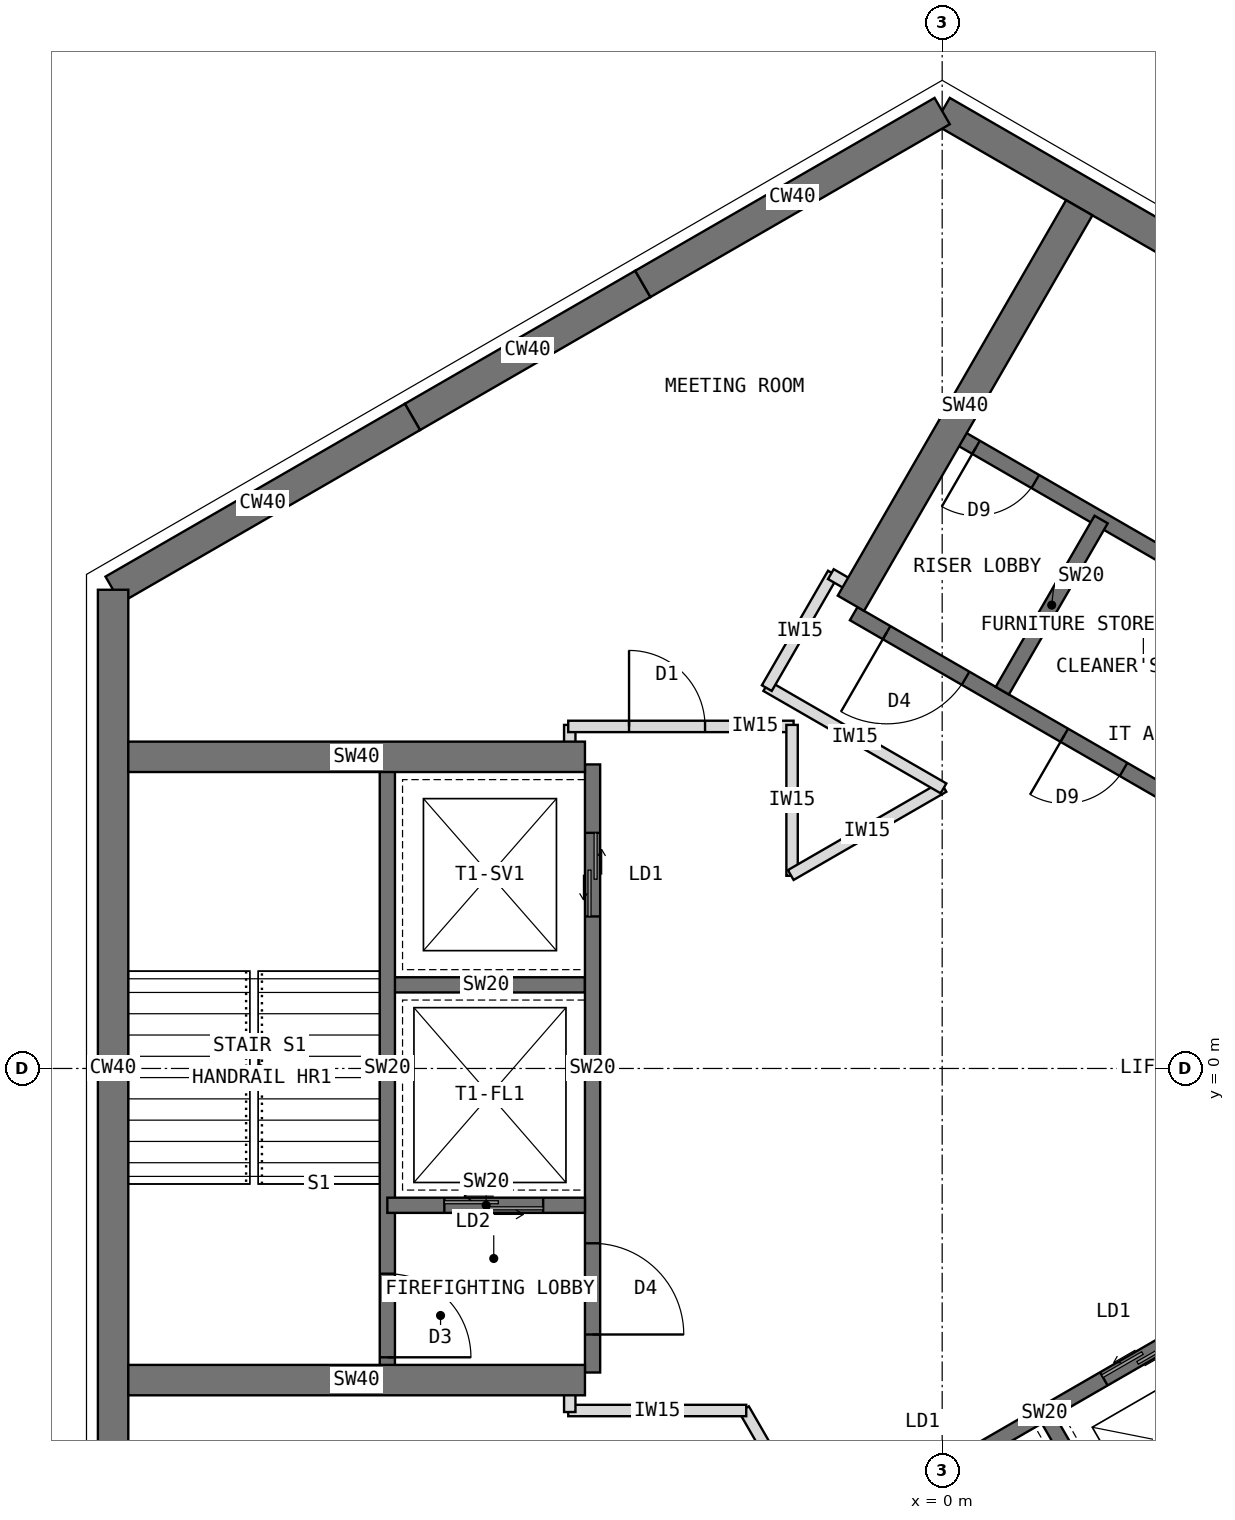
"""IFC4 building model, lengths in metres.
Left out: names, types, materials, properties, quantities, classifications, styles, units other than length and angle.
Written with IfcOpenShell. Run it as: python <this file> out.ifc"""

import sys

from ifc_helpers import new_model, si_unit, direction, frame, frame_2d, origin, place, context, subcontext, project, spatial, rectangle, extrude, element, fill, save


model = new_model("IFC4")
c1 = context("Model", 3, precision=1e-05, world=origin(), true_north=direction((0.0, 1.0)))
c2 = subcontext(c1, "Body", "Model", "MODEL_VIEW")
j1 = project(units=[si_unit("LENGTHUNIT", "METRE"), si_unit("PLANEANGLEUNIT", "RADIAN")], contexts=[c1])
p1 = place(None, origin())
s1 = spatial("IfcSite", under=j1, at=p1, CompositionType="ELEMENT")
p2 = place(p1, origin())
s2 = spatial("IfcBuilding", under=s1, at=p2, CompositionType="ELEMENT")
p3 = place(p2, frame((0.0, 0.0, 259.5)))
s3 = spatial("IfcBuildingStorey", under=s2, at=p3, CompositionType="ELEMENT", Elevation=259.5)
p4 = place(p3, frame((10.908, 6.298, 0.0), z_axis=(0.0, 0.0, 1.0), x_axis=(-0.866021940709, 0.500005998175, 0.0)))
e1 = element("IfcWall", 1, at=p4, inside=s3, PredefinedType="SHEAR", context=c2, shape_type="SweptSolid", body=[
    extrude(rectangle(XDim=12.596, YDim=0.4, at=frame_2d((6.298, 0.0))), origin(), (0.0, 0.0, 1.0), 4.0),
])
p5 = place(p3, frame((0.0, 12.596, 0.0), z_axis=(0.0, 0.0, 1.0), x_axis=(-0.866011268655, -0.500024481964, 0.0)))
e2 = element("IfcWall", 2, at=p5, inside=s3, PredefinedType="SHEAR", context=c2, shape_type="SweptSolid", body=[
    extrude(rectangle(XDim=4.548, YDim=0.4, at=frame_2d((2.274, 0.0))), origin(), (0.0, 0.0, 1.0), 4.0),
])
p6 = place(p3, frame((-3.939, 10.322, 0.0), z_axis=(0.0, 0.0, 1.0), x_axis=(-0.866019471182, -0.500010275428, 0.0)))
e3 = element("IfcWall", 3, at=p6, inside=s3, PredefinedType="SHEAR", context=c2, shape_type="SweptSolid", body=[
    extrude(rectangle(XDim=3.5, YDim=0.4, at=frame_2d((1.75, 0.0))), origin(), (0.0, 0.0, 1.0), 4.0),
])
p7 = place(p3, frame((-6.97, 8.572, 0.0), z_axis=(0.0, 0.0, 1.0), x_axis=(-0.866034513004, -0.499984222037, 0.0)))
e4 = element("IfcWall", 4, at=p7, inside=s3, PredefinedType="SHEAR", context=c2, shape_type="SweptSolid", body=[
    extrude(rectangle(XDim=4.548, YDim=0.4, at=frame_2d((2.274, 0.0))), origin(), (0.0, 0.0, 1.0), 4.0),
])
p8 = place(p3, frame((-10.908, 6.298, 0.0), z_axis=(0.0, 0.0, 1.0), x_axis=(0.0, -1.0, 0.0)))
e5 = element("IfcWall", 5, at=p8, inside=s3, PredefinedType="SHEAR", context=c2, shape_type="SweptSolid", body=[
    extrude(rectangle(XDim=12.596, YDim=0.4, at=frame_2d((6.298, 0.0))), origin(), (0.0, 0.0, 1.0), 4.0),
])
p9 = place(p3, frame((5.764, 1.984, 0.0), z_axis=(0.0, 0.0, 1.0), x_axis=(-0.866026010844, 0.49999894854, 0.0)))
e6 = element("IfcWall", 6, at=p9, inside=s3, PredefinedType="SHEAR", context=c2, shape_type="SweptSolid", body=[
    extrude(rectangle(XDim=8.0, YDim=0.2, at=frame_2d((4.0, 0.0))), origin(), (0.0, 0.0, 1.0), 4.0),
])
p10 = place(p9, frame((6.3, 0.0, 0.0)))
e7 = element("IfcOpeningElement", 7, at=p10, cuts=e6, PredefinedType="OPENING", context=c2, shape_type="SweptSolid", body=[
    extrude(rectangle(XDim=1.2, YDim=2.1, at=frame_2d((0.6, 1.05))), frame((0.0, 0.11, 0.0), z_axis=(0.0, -1.0, 0.0), x_axis=(1.0, 0.0, 0.0)), (0.0, 0.0, 1.0), 0.22),
])
p11 = place(p9, frame((1.0, 0.0, 0.0)))
e8 = element("IfcOpeningElement", 8, at=p11, cuts=e6, PredefinedType="OPENING", context=c2, shape_type="SweptSolid", body=[
    extrude(rectangle(XDim=0.9, YDim=2.1, at=frame_2d((0.45, 1.05))), frame((0.0, 0.11, 0.0), z_axis=(0.0, -1.0, 0.0), x_axis=(1.0, 0.0, 0.0)), (0.0, 0.0, 1.0), 0.22),
])
p12 = place(p9, frame((3.9, 0.0, 0.0)))
e9 = element("IfcOpeningElement", 9, at=p12, cuts=e6, PredefinedType="OPENING", context=c2, shape_type="SweptSolid", body=[
    extrude(rectangle(XDim=0.9, YDim=2.1, at=frame_2d((0.45, 1.05))), frame((0.0, 0.11, 0.0), z_axis=(0.0, -1.0, 0.0), x_axis=(1.0, 0.0, 0.0)), (0.0, 0.0, 1.0), 0.22),
])
p13 = place(p3, frame((0.791, 4.97, 0.0), z_axis=(0.0, 0.0, 1.0), x_axis=(0.499936506574, 0.866062058628, 0.0)))
e10 = element("IfcWall", 10, at=p13, inside=s3, PredefinedType="SHEAR", context=c2, shape_type="SweptSolid", body=[
    extrude(rectangle(XDim=2.6, YDim=0.2, at=frame_2d((1.3, 0.0))), origin(), (0.0, 0.0, 1.0), 4.0),
])
p14 = place(p3, frame((7.114, 4.322, 0.0), z_axis=(0.0, 0.0, 1.0), x_axis=(-0.866026010844, 0.49999894854, 0.0)))
e11 = element("IfcWall", 11, at=p14, inside=s3, PredefinedType="SHEAR", context=c2, shape_type="SweptSolid", body=[
    extrude(rectangle(XDim=8.0, YDim=0.2, at=frame_2d((4.0, 0.0))), origin(), (0.0, 0.0, 1.0), 4.0),
])
p15 = place(p14, frame((6.8, 0.0, 0.0)))
e12 = element("IfcOpeningElement", 12, at=p15, cuts=e11, PredefinedType="OPENING", context=c2, shape_type="SweptSolid", body=[
    extrude(rectangle(XDim=0.9, YDim=2.1, at=frame_2d((0.45, 1.05))), frame((0.0, 0.11, 0.0), z_axis=(0.0, -1.0, 0.0), x_axis=(1.0, 0.0, 0.0)), (0.0, 0.0, 1.0), 0.22),
])
p16 = place(p3, frame((-1.201, 6.12, 0.0), z_axis=(0.0, 0.0, 1.0), x_axis=(0.499997979876, 0.866026570101, 0.0)))
e13 = element("IfcWall", 13, at=p16, inside=s3, PredefinedType="SHEAR", context=c2, shape_type="SweptSolid", body=[
    extrude(rectangle(XDim=6.008, YDim=0.4, at=frame_2d((3.004, 0.0))), origin(), (0.0, 0.0, 1.0), 4.0),
])
p17 = place(p3, frame((-4.6, 4.0, 0.0), z_axis=(0.0, 0.0, 1.0), x_axis=(0.0, -1.0, 0.0)))
e14 = element("IfcWall", 14, at=p17, inside=s3, PredefinedType="SHEAR", context=c2, shape_type="SweptSolid", body=[
    extrude(rectangle(XDim=8.0, YDim=0.2, at=frame_2d((4.0, 0.0))), origin(), (0.0, 0.0, 1.0), 4.0),
])
p18 = place(p17, frame((6.3, 0.0, 0.0)))
e15 = element("IfcOpeningElement", 15, at=p18, cuts=e14, PredefinedType="OPENING", context=c2, shape_type="SweptSolid", body=[
    extrude(rectangle(XDim=1.2, YDim=2.1, at=frame_2d((0.6, 1.05))), frame((0.0, 0.11, 0.0), z_axis=(0.0, -1.0, 0.0), x_axis=(1.0, 0.0, 0.0)), (0.0, 0.0, 1.0), 0.22),
])
p19 = place(p17, frame((0.9, 0.0, 0.0)))
e16 = element("IfcOpeningElement", 16, at=p19, cuts=e14, PredefinedType="OPENING", context=c2, shape_type="SweptSolid", body=[
    extrude(rectangle(XDim=1.1, YDim=2.2, at=frame_2d((0.55, 1.1))), frame((0.0, 0.11, 0.0), z_axis=(0.0, -1.0, 0.0), x_axis=(1.0, 0.0, 0.0)), (0.0, 0.0, 1.0), 0.22),
])
p20 = place(p3, frame((-4.7, 1.1, 0.0), z_axis=(0.0, 0.0, 1.0), x_axis=(-1.0, 0.0, 0.0)))
e17 = element("IfcWall", 17, at=p20, inside=s3, PredefinedType="SHEAR", context=c2, shape_type="SweptSolid", body=[
    extrude(rectangle(XDim=2.6, YDim=0.2, at=frame_2d((1.3, 0.0))), origin(), (0.0, 0.0, 1.0), 4.0),
])
p21 = place(p3, frame((-4.7, -1.8, 0.0), z_axis=(0.0, 0.0, 1.0), x_axis=(-1.0, 0.0, 0.0)))
e18 = element("IfcWall", 18, at=p21, inside=s3, PredefinedType="SHEAR", context=c2, shape_type="SweptSolid", body=[
    extrude(rectangle(XDim=2.6, YDim=0.2, at=frame_2d((1.3, 0.0))), origin(), (0.0, 0.0, 1.0), 4.0),
])
p22 = place(p21, frame((0.55, 0.0, 0.0)))
e19 = element("IfcOpeningElement", 19, at=p22, cuts=e18, PredefinedType="OPENING", context=c2, shape_type="SweptSolid", body=[
    extrude(rectangle(XDim=1.3, YDim=2.2, at=frame_2d((0.65, 1.1))), frame((0.0, 0.11, 0.0), z_axis=(0.0, -1.0, 0.0), x_axis=(1.0, 0.0, 0.0)), (0.0, 0.0, 1.0), 0.22),
])
p23 = place(p3, frame((-7.3, 4.0, 0.0), z_axis=(0.0, 0.0, 1.0), x_axis=(0.0, -1.0, 0.0)))
e20 = element("IfcWall", 20, at=p23, inside=s3, PredefinedType="SHEAR", context=c2, shape_type="SweptSolid", body=[
    extrude(rectangle(XDim=8.0, YDim=0.2, at=frame_2d((4.0, 0.0))), origin(), (0.0, 0.0, 1.0), 4.0),
])
p24 = place(p23, frame((6.7, 0.0, 0.0)))
e21 = element("IfcOpeningElement", 21, at=p24, cuts=e20, PredefinedType="OPENING", context=c2, shape_type="SweptSolid", body=[
    extrude(rectangle(XDim=1.1, YDim=2.1, at=frame_2d((0.55, 1.05))), frame((0.0, 0.11, 0.0), z_axis=(0.0, -1.0, 0.0), x_axis=(1.0, 0.0, 0.0)), (0.0, 0.0, 1.0), 0.22),
])
for number, where, z_axis, x_axis in (
    (22, (-4.7, -4.1, 0.0), (0.0, 0.0, 1.0), (-1.0, 0.0, 0.0)),
    (23, (-4.7, 4.1, 0.0), (0.0, 0.0, 1.0), (-1.0, 0.0, 0.0)),
):
    element("IfcWall", number, at=place(p3, frame(where, z_axis=z_axis, x_axis=x_axis)), inside=s3, PredefinedType="SHEAR", context=c2, shape_type="SweptSolid", body=[
        extrude(rectangle(XDim=6.008, YDim=0.4, at=frame_2d((3.004, 0.0))), origin(), (0.0, 0.0, 1.0), 4.0),
    ])
p25 = place(p3, frame((-1.164, -5.984, 0.0), z_axis=(0.0, 0.0, 1.0), x_axis=(0.866026010844, 0.49999894854, 0.0)))
e24 = element("IfcWall", 24, at=p25, inside=s3, PredefinedType="SHEAR", context=c2, shape_type="SweptSolid", body=[
    extrude(rectangle(XDim=8.0, YDim=0.2, at=frame_2d((4.0, 0.0))), origin(), (0.0, 0.0, 1.0), 4.0),
])
p26 = place(p25, frame((6.3, 0.0, 0.0)))
e25 = element("IfcOpeningElement", 25, at=p26, cuts=e24, PredefinedType="OPENING", context=c2, shape_type="SweptSolid", body=[
    extrude(rectangle(XDim=1.2, YDim=2.1, at=frame_2d((0.6, 1.05))), frame((0.0, 0.11, 0.0), z_axis=(0.0, -1.0, 0.0), x_axis=(1.0, 0.0, 0.0)), (0.0, 0.0, 1.0), 0.22),
])
p27 = place(p25, frame((0.9, 0.0, 0.0)))
e26 = element("IfcOpeningElement", 26, at=p27, cuts=e24, PredefinedType="OPENING", context=c2, shape_type="SweptSolid", body=[
    extrude(rectangle(XDim=1.1, YDim=2.2, at=frame_2d((0.55, 1.1))), frame((0.0, 0.11, 0.0), z_axis=(0.0, -1.0, 0.0), x_axis=(1.0, 0.0, 0.0)), (0.0, 0.0, 1.0), 0.22),
])
p28 = place(p25, frame((3.8, 0.0, 0.0)))
e27 = element("IfcOpeningElement", 27, at=p28, cuts=e24, PredefinedType="OPENING", context=c2, shape_type="SweptSolid", body=[
    extrude(rectangle(XDim=1.1, YDim=2.2, at=frame_2d((0.55, 1.1))), frame((0.0, 0.11, 0.0), z_axis=(0.0, -1.0, 0.0), x_axis=(1.0, 0.0, 0.0)), (0.0, 0.0, 1.0), 0.22),
])
p29 = place(p3, frame((1.397, -4.62, 0.0), z_axis=(0.0, 0.0, 1.0), x_axis=(0.499936506574, -0.866062058628, 0.0)))
e28 = element("IfcWall", 28, at=p29, inside=s3, PredefinedType="SHEAR", context=c2, shape_type="SweptSolid", body=[
    extrude(rectangle(XDim=2.6, YDim=0.2, at=frame_2d((1.3, 0.0))), origin(), (0.0, 0.0, 1.0), 4.0),
])
p30 = place(p3, frame((0.186, -8.322, 0.0), z_axis=(0.0, 0.0, 1.0), x_axis=(0.866026010844, 0.49999894854, 0.0)))
e29 = element("IfcWall", 29, at=p30, inside=s3, PredefinedType="SHEAR", context=c2, shape_type="SweptSolid", body=[
    extrude(rectangle(XDim=8.0, YDim=0.2, at=frame_2d((4.0, 0.0))), origin(), (0.0, 0.0, 1.0), 4.0),
])
p31 = place(p30, frame((6.7, 0.0, 0.0)))
e30 = element("IfcOpeningElement", 30, at=p31, cuts=e29, PredefinedType="OPENING", context=c2, shape_type="SweptSolid", body=[
    extrude(rectangle(XDim=1.1, YDim=2.1, at=frame_2d((0.55, 1.05))), frame((0.0, 0.11, 0.0), z_axis=(0.0, -1.0, 0.0), x_axis=(1.0, 0.0, 0.0)), (0.0, 0.0, 1.0), 0.22),
])
p32 = place(p3, frame((-1.437, -6.511, 0.0), z_axis=(0.0, 0.0, 1.0), x_axis=(-0.500074377092, 0.865982457891, 0.0)))
e31 = element("IfcWall", 31, at=p32, inside=s3, PredefinedType="PARTITIONING", context=c2, shape_type="SweptSolid", body=[
    extrude(rectangle(XDim=2.342, YDim=0.15, at=frame_2d((1.171, 0.0))), origin(), (0.0, 0.0, 1.0), 3.8),
])
p33 = place(p32, frame((0.671, 0.0, 0.0)))
e32 = element("IfcOpeningElement", 32, at=p33, cuts=e31, PredefinedType="OPENING", context=c2, shape_type="SweptSolid", body=[
    extrude(rectangle(XDim=1.0, YDim=2.1, at=frame_2d((0.5, 1.05))), frame((0.0, 0.085, 0.0), z_axis=(0.0, -1.0, 0.0), x_axis=(1.0, 0.0, 0.0)), (0.0, 0.0, 1.0), 0.17),
])
p34 = place(p3, frame((-2.578, -4.5, 0.0), z_axis=(0.0, 0.0, 1.0), x_axis=(-1.0, 0.0, 0.0)))
e33 = element("IfcWall", 33, at=p34, inside=s3, PredefinedType="PARTITIONING", context=c2, shape_type="SweptSolid", body=[
    extrude(rectangle(XDim=2.342, YDim=0.15, at=frame_2d((1.171, 0.0))), origin(), (0.0, 0.0, 1.0), 3.8),
])
for number, where, z_axis, x_axis in (
    (34, (-4.9, -4.52, 0.0), (0.0, 0.0, 1.0), (0.0, 1.0, 0.0)),
    (35, (-4.9, 4.09, 0.0), (0.0, 0.0, 1.0), (0.0, 1.0, 0.0)),
):
    element("IfcWall", number, at=place(p3, frame(where, z_axis=z_axis, x_axis=x_axis)), inside=s3, PredefinedType="PARTITIONING", context=c2, shape_type="SweptSolid", body=[
        extrude(rectangle(XDim=0.43, YDim=0.15, at=frame_2d((0.215, 0.0))), origin(), (0.0, 0.0, 1.0), 3.8),
    ])
p35 = place(p3, frame((-4.92, 4.5, 0.0), z_axis=(0.0, 0.0, 1.0), x_axis=(1.0, 0.0, 0.0)))
e36 = element("IfcWall", 36, at=p35, inside=s3, PredefinedType="PARTITIONING", context=c2, shape_type="SweptSolid", body=[
    extrude(rectangle(XDim=2.965, YDim=0.15, at=frame_2d((1.482, 0.0))), origin(), (0.0, 0.0, 1.0), 3.8),
])
p36 = place(p35, frame((0.8, 0.0, 0.0)))
e37 = element("IfcOpeningElement", 37, at=p36, cuts=e36, PredefinedType="OPENING", context=c2, shape_type="SweptSolid", body=[
    extrude(rectangle(XDim=1.0, YDim=2.1, at=frame_2d((0.5, 1.05))), frame((0.0, 0.085, 0.0), z_axis=(0.0, -1.0, 0.0), x_axis=(1.0, 0.0, 0.0)), (0.0, 0.0, 1.0), 0.17),
])
p37 = place(p3, frame((-1.975, 4.52, 0.0), z_axis=(0.0, 0.0, 1.0), x_axis=(0.0, -1.0, 0.0)))
e38 = element("IfcWall", 38, at=p37, inside=s3, PredefinedType="PARTITIONING", context=c2, shape_type="SweptSolid", body=[
    extrude(rectangle(XDim=1.985, YDim=0.15, at=frame_2d((0.993, 0.0))), origin(), (0.0, 0.0, 1.0), 3.8),
])
p38 = place(p3, frame((-1.992, 2.545, 0.0), z_axis=(0.0, 0.0, 1.0), x_axis=(0.866059450854, 0.499941024108, 0.0)))
e39 = element("IfcWall", 39, at=p38, inside=s3, PredefinedType="PARTITIONING", context=c2, shape_type="SweptSolid", body=[
    extrude(rectangle(XDim=2.321, YDim=0.15, at=frame_2d((1.16, 0.0))), origin(), (0.0, 0.0, 1.0), 3.8),
])
p39 = place(p3, frame((0.017, 3.685, 0.0), z_axis=(0.0, 0.0, 1.0), x_axis=(-0.866036099759, 0.499981473571, 0.0)))
e40 = element("IfcWall", 40, at=p39, inside=s3, PredefinedType="PARTITIONING", context=c2, shape_type="SweptSolid", body=[
    extrude(rectangle(XDim=2.692, YDim=0.15, at=frame_2d((1.346, 0.0))), origin(), (0.0, 0.0, 1.0), 3.8),
])
p40 = place(p3, frame((-2.307, 5.004, 0.0), z_axis=(0.0, 0.0, 1.0), x_axis=(0.500062521093, 0.865989304205, 0.0)))
e41 = element("IfcWall", 41, at=p40, inside=s3, PredefinedType="PARTITIONING", context=c2, shape_type="SweptSolid", body=[
    extrude(rectangle(XDim=1.74, YDim=0.15, at=frame_2d((0.87, 0.0))), origin(), (0.0, 0.0, 1.0), 3.8),
])
p41 = place(p3, frame((-1.464, 6.503, 0.0), z_axis=(0.0, 0.0, 1.0), x_axis=(0.866138304741, -0.499804398801, 0.0)))
e42 = element("IfcWall", 42, at=p41, inside=s3, PredefinedType="PARTITIONING", context=c2, shape_type="SweptSolid", body=[
    extrude(rectangle(XDim=0.43, YDim=0.15, at=frame_2d((0.215, 0.0))), origin(), (0.0, 0.0, 1.0), 3.8),
])
p42 = place(p10, origin())
e43 = element("IfcDoor", 43, at=p42, inside=s3, OperationType="SINGLE_SWING_RIGHT", PredefinedType="DOOR", context=c2, shape_type="SweptSolid", body=[
    extrude(rectangle(XDim=1.2, YDim=2.1, at=frame_2d((0.6, 1.05))), frame((0.0, 0.025, 0.0), z_axis=(0.0, -1.0, 0.0), x_axis=(1.0, 0.0, 0.0)), (0.0, 0.0, 1.0), 0.05),
])
fill(e7, e43)
p43 = place(p15, origin())
e44 = element("IfcDoor", 44, at=p43, inside=s3, OperationType="SINGLE_SWING_RIGHT", PredefinedType="DOOR", context=c2, shape_type="SweptSolid", body=[
    extrude(rectangle(XDim=0.9, YDim=2.1, at=frame_2d((0.45, 1.05))), frame((0.0, 0.025, 0.0), z_axis=(0.0, -1.0, 0.0), x_axis=(1.0, 0.0, 0.0)), (0.0, 0.0, 1.0), 0.05),
])
fill(e12, e44)
p44 = place(p18, origin())
e45 = element("IfcDoor", 45, at=p44, inside=s3, OperationType="SINGLE_SWING_RIGHT", PredefinedType="DOOR", context=c2, shape_type="SweptSolid", body=[
    extrude(rectangle(XDim=1.2, YDim=2.1, at=frame_2d((0.6, 1.05))), frame((0.0, 0.025, 0.0), z_axis=(0.0, -1.0, 0.0), x_axis=(1.0, 0.0, 0.0)), (0.0, 0.0, 1.0), 0.05),
])
fill(e15, e45)
p45 = place(p22, origin())
e46 = element("IfcDoor", 46, at=p45, inside=s3, OperationType="DOUBLE_DOOR_SLIDING", PredefinedType="DOOR", context=c2, shape_type="SweptSolid", body=[
    extrude(rectangle(XDim=1.3, YDim=2.2, at=frame_2d((0.65, 1.1))), frame((0.0, 0.025, 0.0), z_axis=(0.0, -1.0, 0.0), x_axis=(1.0, 0.0, 0.0)), (0.0, 0.0, 1.0), 0.05),
])
fill(e19, e46)
p46 = place(p19, origin())
e47 = element("IfcDoor", 47, at=p46, inside=s3, OperationType="DOUBLE_DOOR_SLIDING", PredefinedType="DOOR", context=c2, shape_type="SweptSolid", body=[
    extrude(rectangle(XDim=1.1, YDim=2.2, at=frame_2d((0.55, 1.1))), frame((0.0, 0.025, 0.0), z_axis=(0.0, -1.0, 0.0), x_axis=(1.0, 0.0, 0.0)), (0.0, 0.0, 1.0), 0.05),
])
fill(e16, e47)
p47 = place(p24, origin())
e48 = element("IfcDoor", 48, at=p47, inside=s3, OperationType="SINGLE_SWING_RIGHT", PredefinedType="DOOR", context=c2, shape_type="SweptSolid", body=[
    extrude(rectangle(XDim=1.1, YDim=2.1, at=frame_2d((0.55, 1.05))), frame((0.0, 0.025, 0.0), z_axis=(0.0, -1.0, 0.0), x_axis=(1.0, 0.0, 0.0)), (0.0, 0.0, 1.0), 0.05),
])
fill(e21, e48)
p48 = place(p28, origin())
e49 = element("IfcDoor", 49, at=p48, inside=s3, OperationType="DOUBLE_DOOR_SLIDING", PredefinedType="DOOR", context=c2, shape_type="SweptSolid", body=[
    extrude(rectangle(XDim=1.1, YDim=2.2, at=frame_2d((0.55, 1.1))), frame((0.0, 0.025, 0.0), z_axis=(0.0, -1.0, 0.0), x_axis=(1.0, 0.0, 0.0)), (0.0, 0.0, 1.0), 0.05),
])
fill(e27, e49)
p49 = place(p36, origin())
e50 = element("IfcDoor", 50, at=p49, inside=s3, OperationType="SINGLE_SWING_LEFT", PredefinedType="DOOR", context=c2, shape_type="SweptSolid", body=[
    extrude(rectangle(XDim=1.0, YDim=2.1, at=frame_2d((0.5, 1.05))), frame((0.0, 0.025, 0.0), z_axis=(0.0, -1.0, 0.0), x_axis=(1.0, 0.0, 0.0)), (0.0, 0.0, 1.0), 0.05),
])
fill(e37, e50)
p50 = place(p12, origin())
e51 = element("IfcDoor", 51, at=p50, inside=s3, OperationType="SINGLE_SWING_RIGHT", PredefinedType="DOOR", context=c2, shape_type="SweptSolid", body=[
    extrude(rectangle(XDim=0.9, YDim=2.1, at=frame_2d((0.45, 1.05))), frame((0.0, 0.025, 0.0), z_axis=(0.0, -1.0, 0.0), x_axis=(1.0, 0.0, 0.0)), (0.0, 0.0, 1.0), 0.05),
])
fill(e9, e51)
save(model, sys.argv[1])
